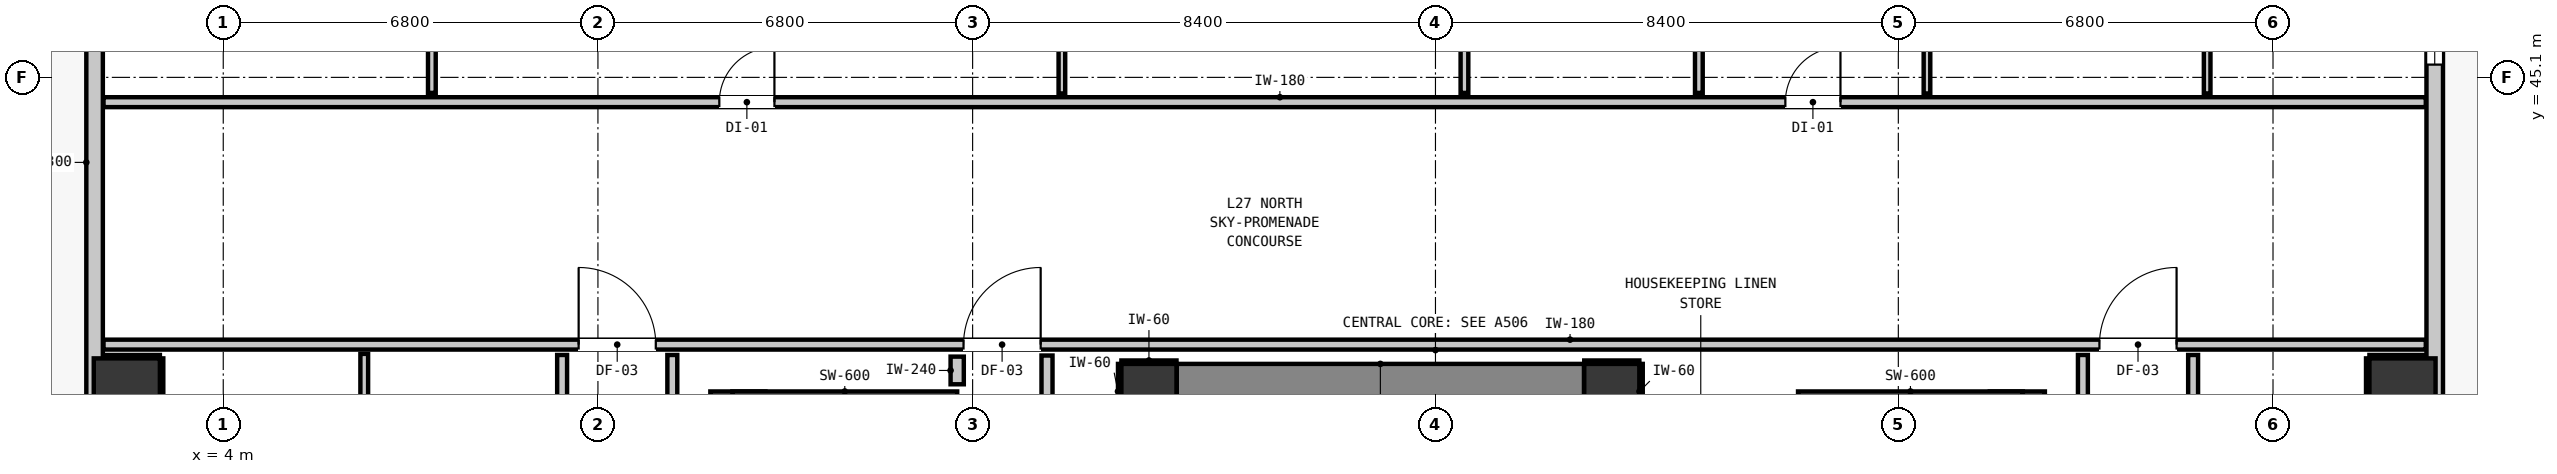
"""IFC4 building model, lengths in metres.
Left out: names, types, materials, properties, quantities, classifications, styles, units other than length and angle.
Written with IfcOpenShell. Run it as: python <this file> out.ifc"""

import sys

from ifc_helpers import new_model, si_unit, direction, frame, frame_2d, origin, origin_2d, place, context, subcontext, project, spatial, rectangle, extrude, element, fill, save


model = new_model("IFC4")
c1 = context("Model", 3, precision=1e-05, world=origin(), true_north=direction((0.0, 1.0)))
c2 = subcontext(c1, "Body", "Model", "MODEL_VIEW")
j1 = project(units=[si_unit("LENGTHUNIT", "METRE"), si_unit("PLANEANGLEUNIT", "RADIAN")], contexts=[c1])
p1 = place(None, origin())
s1 = spatial("IfcSite", under=j1, at=p1, CompositionType="ELEMENT")
p2 = place(p1, origin())
s2 = spatial("IfcBuilding", under=s1, at=p2, CompositionType="ELEMENT")
p3 = place(p2, frame((0.0, 0.0, 96.12)))
s3 = spatial("IfcBuildingStorey", under=s2, at=p3, CompositionType="ELEMENT", Elevation=96.12)
for number, where, z_axis, x_axis in (
    (1, (20.8, 39.4, 0.0), (0.0, 0.0, 1.0), (1.0, 0.0, 0.0)),
    (2, (29.2, 39.4, 0.0), (0.0, 0.0, 1.0), (1.0, 0.0, 0.0)),
):
    element("IfcColumn", number, at=place(p3, frame(where, z_axis=z_axis, x_axis=x_axis)), inside=s3, PredefinedType="COLUMN", context=c2, shape_type="SweptSolid", body=[
        extrude(rectangle(XDim=1.0, YDim=1.0, at=origin_2d()), origin(), (0.0, 0.0, 1.0), 3.32),
    ])
p4 = place(p3, frame((13.34, 31.205, 0.0), z_axis=(0.0, 0.0, 1.0), x_axis=(0.0, 1.0, 0.0)))
e3 = element("IfcWall", 3, at=p4, inside=s3, PredefinedType="SHEAR", context=c2, shape_type="SweptSolid", body=[
    extrude(rectangle(XDim=8.195, YDim=1.0, at=frame_2d((4.097, 0.0))), origin(), (0.0, 0.0, 1.0), 3.32),
])
p5 = place(p3, frame((13.24, 39.1, 0.0), z_axis=(0.0, 0.0, 1.0), x_axis=(1.0, 0.0, 0.0)))
e4 = element("IfcWall", 4, at=p5, inside=s3, PredefinedType="SHEAR", context=c2, shape_type="SweptSolid", body=[
    extrude(rectangle(XDim=4.08, YDim=0.6, at=frame_2d((2.04, 0.0))), origin(), (0.0, 0.0, 1.0), 3.32),
])
p6 = place(p3, frame((36.56, 31.205, 0.0), z_axis=(0.0, 0.0, 1.0), x_axis=(0.0, 1.0, 0.0)))
e5 = element("IfcWall", 5, at=p6, inside=s3, PredefinedType="SHEAR", context=c2, shape_type="SweptSolid", body=[
    extrude(rectangle(XDim=8.195, YDim=1.0, at=frame_2d((4.097, 0.0))), origin(), (0.0, 0.0, 1.0), 3.32),
])
p7 = place(p3, frame((32.58, 39.1, 0.0), z_axis=(0.0, 0.0, 1.0), x_axis=(1.0, 0.0, 0.0)))
e6 = element("IfcWall", 6, at=p7, inside=s3, PredefinedType="SHEAR", context=c2, shape_type="SweptSolid", body=[
    extrude(rectangle(XDim=4.08, YDim=0.6, at=frame_2d((2.04, 0.0))), origin(), (0.0, 0.0, 1.0), 3.32),
])
p8 = place(p3, frame((21.305, 39.4, 0.0), z_axis=(0.0, 0.0, 1.0), x_axis=(1.0, 0.0, 0.0)))
e7 = element("IfcWall", 7, at=p8, inside=s3, PredefinedType="SHEAR", context=c2, shape_type="SweptSolid", body=[
    extrude(rectangle(XDim=7.39, YDim=1.0, at=frame_2d((3.695, 0.0))), origin(), (0.0, 0.0, 1.0), 3.32),
])
for number, where, z_axis, x_axis in (
    (8, (2.25, 39.4, 0.0), (0.0, 0.0, 1.0), (1.0, 0.0, 0.0)),
    (9, (43.55, 39.4, 0.0), (0.0, 0.0, 1.0), (1.0, 0.0, 0.0)),
):
    element("IfcColumn", number, at=place(p3, frame(where, z_axis=z_axis, x_axis=x_axis)), inside=s3, PredefinedType="COLUMN", context=c2, shape_type="SweptSolid", body=[
        extrude(rectangle(XDim=1.2, YDim=1.2, at=origin_2d()), origin(), (0.0, 0.0, 1.0), 3.32),
    ])
p9 = place(p3, frame((1.665, 16.365, 0.0), z_axis=(0.0, 0.0, 1.0), x_axis=(0.0, 1.0, 0.0)))
e10 = element("IfcWall", 10, at=p9, inside=s3, PredefinedType="STANDARD", context=c2, shape_type="SweptSolid", body=[
    extrude(rectangle(XDim=34.67, YDim=0.3, at=frame_2d((17.335, 0.0))), origin(), (0.0, 0.0, 1.0), 3.06),
])
p10 = place(p9, frame((6.854, 0.0, 0.0)))
e11 = element("IfcOpeningElement", 11, at=p10, cuts=e10, PredefinedType="OPENING", context=c2, shape_type="SweptSolid", body=[
    extrude(rectangle(XDim=1.0, YDim=2.15, at=frame_2d((0.5, 1.075))), frame((0.0, 0.16, 0.0), z_axis=(0.0, -1.0, 0.0), x_axis=(1.0, 0.0, 0.0)), (0.0, 0.0, 1.0), 0.32),
])
p11 = place(p9, frame((32.839, 0.0, 0.85)))
e12 = element("IfcOpeningElement", 12, at=p11, cuts=e10, PredefinedType="OPENING", context=c2, shape_type="SweptSolid", body=[
    extrude(rectangle(XDim=1.05, YDim=1.65, at=frame_2d((0.525, 0.825))), frame((0.0, 0.16, 0.0), z_axis=(0.0, -1.0, 0.0), x_axis=(1.0, 0.0, 0.0)), (0.0, 0.0, 1.0), 0.32),
])
p12 = place(p9, frame((10.044, 0.0, 0.85)))
e13 = element("IfcOpeningElement", 13, at=p12, cuts=e10, PredefinedType="OPENING", context=c2, shape_type="SweptSolid", body=[
    extrude(rectangle(XDim=2.4, YDim=1.95, at=frame_2d((1.2, 0.975))), frame((0.0, 0.16, 0.0), z_axis=(0.0, -1.0, 0.0), x_axis=(1.0, 0.0, 0.0)), (0.0, 0.0, 1.0), 0.32),
])
p13 = place(p9, frame((19.145, 0.0, 0.85)))
e14 = element("IfcOpeningElement", 14, at=p13, cuts=e10, PredefinedType="OPENING", context=c2, shape_type="SweptSolid", body=[
    extrude(rectangle(XDim=2.4, YDim=1.95, at=frame_2d((1.2, 0.975))), frame((0.0, 0.16, 0.0), z_axis=(0.0, -1.0, 0.0), x_axis=(1.0, 0.0, 0.0)), (0.0, 0.0, 1.0), 0.32),
])
p14 = place(p3, frame((44.135, 51.035, 0.0), z_axis=(0.0, 0.0, 1.0), x_axis=(0.0, -1.0, 0.0)))
e15 = element("IfcWall", 15, at=p14, inside=s3, PredefinedType="STANDARD", context=c2, shape_type="SweptSolid", body=[
    extrude(rectangle(XDim=34.67, YDim=0.3, at=frame_2d((17.335, 0.0))), origin(), (0.0, 0.0, 1.0), 3.06),
])
p15 = place(p14, frame((0.901, 0.0, 0.0)))
e16 = element("IfcOpeningElement", 16, at=p15, cuts=e15, PredefinedType="OPENING", context=c2, shape_type="SweptSolid", body=[
    extrude(rectangle(XDim=1.0, YDim=2.15, at=frame_2d((0.5, 1.075))), frame((0.0, 0.16, 0.0), z_axis=(0.0, -1.0, 0.0), x_axis=(1.0, 0.0, 0.0)), (0.0, 0.0, 1.0), 0.32),
])
p16 = place(p14, frame((3.303, 0.0, 0.85)))
e17 = element("IfcOpeningElement", 17, at=p16, cuts=e15, PredefinedType="OPENING", context=c2, shape_type="SweptSolid", body=[
    extrude(rectangle(XDim=2.4, YDim=1.95, at=frame_2d((1.2, 0.975))), frame((0.0, 0.16, 0.0), z_axis=(0.0, -1.0, 0.0), x_axis=(1.0, 0.0, 0.0)), (0.0, 0.0, 1.0), 0.32),
])
p17 = place(p14, frame((21.61, 0.0, 0.85)))
e18 = element("IfcOpeningElement", 18, at=p17, cuts=e15, PredefinedType="OPENING", context=c2, shape_type="SweptSolid", body=[
    extrude(rectangle(XDim=2.4, YDim=1.95, at=frame_2d((1.2, 0.975))), frame((0.0, 0.16, 0.0), z_axis=(0.0, -1.0, 0.0), x_axis=(1.0, 0.0, 0.0)), (0.0, 0.0, 1.0), 0.32),
])
p18 = place(p3, frame((1.827, 40.25, 0.0), z_axis=(0.0, 0.0, 1.0), x_axis=(1.0, 0.0, 0.0)))
e19 = element("IfcWall", 19, at=p18, inside=s3, PredefinedType="PARTITIONING", context=c2, shape_type="SweptSolid", body=[
    extrude(rectangle(XDim=42.146, YDim=0.18, at=frame_2d((21.073, 0.0))), origin(), (0.0, 0.0, 1.0), 3.06),
])
p19 = place(p18, frame((15.608, 0.0, 0.0)))
e20 = element("IfcOpeningElement", 20, at=p19, cuts=e19, PredefinedType="OPENING", context=c2, shape_type="SweptSolid", body=[
    extrude(rectangle(XDim=1.4, YDim=2.15, at=frame_2d((0.7, 1.075))), frame((0.0, 0.1, 0.0), z_axis=(0.0, -1.0, 0.0), x_axis=(1.0, 0.0, 0.0)), (0.0, 0.0, 1.0), 0.2),
])
p20 = place(p18, frame((8.623, 0.0, 0.0)))
e21 = element("IfcOpeningElement", 21, at=p20, cuts=e19, PredefinedType="OPENING", context=c2, shape_type="SweptSolid", body=[
    extrude(rectangle(XDim=1.4, YDim=2.15, at=frame_2d((0.7, 1.075))), frame((0.0, 0.1, 0.0), z_axis=(0.0, -1.0, 0.0), x_axis=(1.0, 0.0, 0.0)), (0.0, 0.0, 1.0), 0.2),
])
p21 = place(p18, frame((36.223, 0.0, 0.0)))
e22 = element("IfcOpeningElement", 22, at=p21, cuts=e19, PredefinedType="OPENING", context=c2, shape_type="SweptSolid", body=[
    extrude(rectangle(XDim=1.4, YDim=2.15, at=frame_2d((0.7, 1.075))), frame((0.0, 0.1, 0.0), z_axis=(0.0, -1.0, 0.0), x_axis=(1.0, 0.0, 0.0)), (0.0, 0.0, 1.0), 0.2),
])
p22 = place(p3, frame((1.827, 44.65, 0.0), z_axis=(0.0, 0.0, 1.0), x_axis=(1.0, 0.0, 0.0)))
e23 = element("IfcWall", 23, at=p22, inside=s3, PredefinedType="PARTITIONING", context=c2, shape_type="SweptSolid", body=[
    extrude(rectangle(XDim=42.146, YDim=0.18, at=frame_2d((21.073, 0.0))), origin(), (0.0, 0.0, 1.0), 3.06),
])
p23 = place(p22, frame((11.176, 0.0, 0.0)))
e24 = element("IfcOpeningElement", 24, at=p23, cuts=e23, PredefinedType="OPENING", context=c2, shape_type="SweptSolid", body=[
    extrude(rectangle(XDim=1.0, YDim=2.15, at=frame_2d((0.5, 1.075))), frame((0.0, 0.1, 0.0), z_axis=(0.0, -1.0, 0.0), x_axis=(1.0, 0.0, 0.0)), (0.0, 0.0, 1.0), 0.2),
])
p24 = place(p22, frame((30.523, 0.0, 0.0)))
e25 = element("IfcOpeningElement", 25, at=p24, cuts=e23, PredefinedType="OPENING", context=c2, shape_type="SweptSolid", body=[
    extrude(rectangle(XDim=1.0, YDim=2.15, at=frame_2d((0.5, 1.075))), frame((0.0, 0.1, 0.0), z_axis=(0.0, -1.0, 0.0), x_axis=(1.0, 0.0, 0.0)), (0.0, 0.0, 1.0), 0.2),
])
p25 = place(p3, frame((17.32, 39.53, 0.0), z_axis=(0.0, 0.0, 1.0), x_axis=(0.0, 1.0, 0.0)))
e26 = element("IfcWall", 26, at=p25, inside=s3, PredefinedType="PARTITIONING", context=c2, shape_type="SweptSolid", body=[
    extrude(rectangle(XDim=0.502, YDim=0.24, at=frame_2d((0.251, 0.0))), origin(), (0.0, 0.0, 1.0), 3.06),
])
p26 = place(p3, frame((18.95, 38.918, 0.0), z_axis=(0.0, 0.0, 1.0), x_axis=(0.0, 1.0, 0.0)))
e27 = element("IfcWall", 27, at=p26, inside=s3, PredefinedType="PARTITIONING", context=c2, shape_type="SweptSolid", body=[
    extrude(rectangle(XDim=1.134, YDim=0.2, at=frame_2d((0.567, 0.0))), origin(), (0.0, 0.0, 1.0), 3.06),
])
p27 = place(p3, frame((10.15, 34.688, 0.0), z_axis=(0.0, 0.0, 1.0), x_axis=(0.0, 1.0, 0.0)))
e28 = element("IfcWall", 28, at=p27, inside=s3, PredefinedType="PARTITIONING", context=c2, shape_type="SweptSolid", body=[
    extrude(rectangle(XDim=5.374, YDim=0.18, at=frame_2d((2.687, 0.0))), origin(), (0.0, 0.0, 1.0), 3.06),
])
for number, where, z_axis, x_axis in (
    (29, (12.15, 21.368, 0.0), (0.0, 0.0, 1.0), (0.0, 1.0, 0.0)),
    (30, (37.75, 21.368, 0.0), (0.0, 0.0, 1.0), (0.0, 1.0, 0.0)),
):
    element("IfcWall", number, at=place(p3, frame(where, z_axis=z_axis, x_axis=x_axis)), inside=s3, PredefinedType="PARTITIONING", context=c2, shape_type="SweptSolid", body=[
        extrude(rectangle(XDim=18.694, YDim=0.18, at=frame_2d((9.347, 0.0))), origin(), (0.0, 0.0, 1.0), 3.06),
    ])
p28 = place(p3, frame((39.75, 35.05, 0.0), z_axis=(0.0, 0.0, 1.0), x_axis=(0.0, 1.0, 0.0)))
e31 = element("IfcWall", 31, at=p28, inside=s3, PredefinedType="PARTITIONING", context=c2, shape_type="SweptSolid", body=[
    extrude(rectangle(XDim=5.012, YDim=0.18, at=frame_2d((2.506, 0.0))), origin(), (0.0, 0.0, 1.0), 3.06),
])
p29 = place(p3, frame((6.559, 34.668, 0.0), z_axis=(0.0, 0.0, 1.0), x_axis=(0.0, 1.0, 0.0)))
e32 = element("IfcWall", 32, at=p29, inside=s3, PredefinedType="PARTITIONING", context=c2, shape_type="SweptSolid", body=[
    extrude(rectangle(XDim=5.414, YDim=0.14, at=frame_2d((2.707, 0.0))), origin(), (0.0, 0.0, 1.0), 3.06),
])
p30 = place(p3, frame((7.786, 44.818, 0.0), z_axis=(0.0, 0.0, 1.0), x_axis=(0.0, 1.0, 0.0)))
e33 = element("IfcWall", 33, at=p30, inside=s3, PredefinedType="PARTITIONING", context=c2, shape_type="SweptSolid", body=[
    extrude(rectangle(XDim=3.447, YDim=0.14, at=frame_2d((1.723, 0.0))), origin(), (0.0, 0.0, 1.0), 3.06),
])
p31 = place(p30, frame((1.284, 0.0, 0.0)))
e34 = element("IfcOpeningElement", 34, at=p31, cuts=e33, PredefinedType="OPENING", context=c2, shape_type="SweptSolid", body=[
    extrude(rectangle(XDim=0.86, YDim=2.02, at=frame_2d((0.43, 1.01))), frame((0.0, 0.08, 0.0), z_axis=(0.0, -1.0, 0.0), x_axis=(1.0, 0.0, 0.0)), (0.0, 0.0, 1.0), 0.16),
])
p32 = place(p3, frame((26.526, 44.818, 0.0), z_axis=(0.0, 0.0, 1.0), x_axis=(0.0, 1.0, 0.0)))
e35 = element("IfcWall", 35, at=p32, inside=s3, PredefinedType="PARTITIONING", context=c2, shape_type="SweptSolid", body=[
    extrude(rectangle(XDim=3.447, YDim=0.14, at=frame_2d((1.723, 0.0))), origin(), (0.0, 0.0, 1.0), 3.06),
])
p33 = place(p3, frame((30.78, 44.818, 0.0), z_axis=(0.0, 0.0, 1.0), x_axis=(0.0, 1.0, 0.0)))
e36 = element("IfcWall", 36, at=p33, inside=s3, PredefinedType="PARTITIONING", context=c2, shape_type="SweptSolid", body=[
    extrude(rectangle(XDim=3.447, YDim=0.14, at=frame_2d((1.723, 0.0))), origin(), (0.0, 0.0, 1.0), 3.06),
])
p34 = place(p33, frame((1.296, 0.0, 0.0)))
e37 = element("IfcOpeningElement", 37, at=p34, cuts=e36, PredefinedType="OPENING", context=c2, shape_type="SweptSolid", body=[
    extrude(rectangle(XDim=0.86, YDim=2.02, at=frame_2d((0.43, 1.01))), frame((0.0, 0.08, 0.0), z_axis=(0.0, -1.0, 0.0), x_axis=(1.0, 0.0, 0.0)), (0.0, 0.0, 1.0), 0.16),
])
p35 = place(p3, frame((19.22, 44.808, 0.0), z_axis=(0.0, 0.0, 1.0), x_axis=(0.0, 1.0, 0.0)))
e38 = element("IfcWall", 38, at=p35, inside=s3, PredefinedType="PARTITIONING", context=c2, shape_type="SweptSolid", body=[
    extrude(rectangle(XDim=3.467, YDim=0.12, at=frame_2d((1.733, 0.0))), origin(), (0.0, 0.0, 1.0), 3.06),
])
p36 = place(p35, frame((1.274, 0.0, 0.0)))
e39 = element("IfcOpeningElement", 39, at=p36, cuts=e38, PredefinedType="OPENING", context=c2, shape_type="SweptSolid", body=[
    extrude(rectangle(XDim=0.9, YDim=2.1, at=frame_2d((0.45, 1.05))), frame((0.0, 0.07, 0.0), z_axis=(0.0, -1.0, 0.0), x_axis=(1.0, 0.0, 0.0)), (0.0, 0.0, 1.0), 0.14),
])
p37 = place(p3, frame((34.92, 44.808, 0.0), z_axis=(0.0, 0.0, 1.0), x_axis=(0.0, 1.0, 0.0)))
e40 = element("IfcWall", 40, at=p37, inside=s3, PredefinedType="PARTITIONING", context=c2, shape_type="SweptSolid", body=[
    extrude(rectangle(XDim=3.467, YDim=0.12, at=frame_2d((1.733, 0.0))), origin(), (0.0, 0.0, 1.0), 3.06),
])
p38 = place(p37, frame((1.286, 0.0, 0.0)))
e41 = element("IfcOpeningElement", 41, at=p38, cuts=e40, PredefinedType="OPENING", context=c2, shape_type="SweptSolid", body=[
    extrude(rectangle(XDim=0.9, YDim=2.1, at=frame_2d((0.45, 1.05))), frame((0.0, 0.07, 0.0), z_axis=(0.0, -1.0, 0.0), x_axis=(1.0, 0.0, 0.0)), (0.0, 0.0, 1.0), 0.14),
])
p39 = place(p3, frame((40.005, 44.808, 0.0), z_axis=(0.0, 0.0, 1.0), x_axis=(0.0, 1.0, 0.0)))
e42 = element("IfcWall", 42, at=p39, inside=s3, PredefinedType="PARTITIONING", context=c2, shape_type="SweptSolid", body=[
    extrude(rectangle(XDim=3.467, YDim=0.12, at=frame_2d((1.733, 0.0))), origin(), (0.0, 0.0, 1.0), 2.445),
])
p40 = place(p39, frame((1.273, 0.0, 0.0)))
e43 = element("IfcOpeningElement", 43, at=p40, cuts=e42, PredefinedType="OPENING", context=c2, shape_type="SweptSolid", body=[
    extrude(rectangle(XDim=0.9, YDim=2.1, at=frame_2d((0.45, 1.05))), frame((0.0, 0.07, 0.0), z_axis=(0.0, -1.0, 0.0), x_axis=(1.0, 0.0, 0.0)), (0.0, 0.0, 1.0), 0.14),
])
for number, where, z_axis, x_axis in (
    (44, (20.3, 39.932, 0.0), (0.0, 0.0, 1.0), (1.0, 0.0, 0.0)),
    (45, (20.268, 38.9, 0.0), (0.0, 0.0, 1.0), (0.0, 1.0, 0.0)),
    (46, (28.7, 39.932, 0.0), (0.0, 0.0, 1.0), (1.0, 0.0, 0.0)),
    (47, (29.732, 38.9, 0.0), (0.0, 0.0, 1.0), (0.0, 1.0, 0.0)),
):
    element("IfcWall", number, at=place(p3, frame(where, z_axis=z_axis, x_axis=x_axis)), inside=s3, PredefinedType="PARTITIONING", context=c2, shape_type="SweptSolid", body=[
        extrude(rectangle(XDim=1.0, YDim=0.06, at=frame_2d((0.5, 0.0))), origin(), (0.0, 0.0, 1.0), 1.45),
    ])
p41 = place(p3, frame((1.83, 40.032, 0.0), z_axis=(0.0, 0.0, 1.0), x_axis=(1.0, 0.0, 0.0)))
e48 = element("IfcWall", 48, at=p41, inside=s3, PredefinedType="PARTITIONING", context=c2, shape_type="SweptSolid", body=[
    extrude(rectangle(XDim=1.02, YDim=0.06, at=frame_2d((0.51, 0.0))), origin(), (0.0, 0.0, 1.0), 1.45),
])
p42 = place(p3, frame((2.882, 38.8, 0.0), z_axis=(0.0, 0.0, 1.0), x_axis=(0.0, 1.0, 0.0)))
e49 = element("IfcWall", 49, at=p42, inside=s3, PredefinedType="PARTITIONING", context=c2, shape_type="SweptSolid", body=[
    extrude(rectangle(XDim=1.2, YDim=0.06, at=frame_2d((0.6, 0.0))), origin(), (0.0, 0.0, 1.0), 1.45),
])
p43 = place(p3, frame((42.95, 40.032, 0.0), z_axis=(0.0, 0.0, 1.0), x_axis=(1.0, 0.0, 0.0)))
e50 = element("IfcWall", 50, at=p43, inside=s3, PredefinedType="PARTITIONING", context=c2, shape_type="SweptSolid", body=[
    extrude(rectangle(XDim=1.02, YDim=0.06, at=frame_2d((0.51, 0.0))), origin(), (0.0, 0.0, 1.0), 1.45),
])
p44 = place(p3, frame((42.918, 38.8, 0.0), z_axis=(0.0, 0.0, 1.0), x_axis=(0.0, 1.0, 0.0)))
e51 = element("IfcWall", 51, at=p44, inside=s3, PredefinedType="PARTITIONING", context=c2, shape_type="SweptSolid", body=[
    extrude(rectangle(XDim=1.2, YDim=0.06, at=frame_2d((0.6, 0.0))), origin(), (0.0, 0.0, 1.0), 1.45),
])
p45 = place(p16, origin())
e52 = element("IfcWindow", 52, at=p45, inside=s3, PartitioningType="SINGLE_PANEL", PredefinedType="WINDOW", context=c2, shape_type="SweptSolid", body=[
    extrude(rectangle(XDim=2.4, YDim=1.95, at=frame_2d((1.2, 0.975))), frame((0.0, 0.03, 0.0), z_axis=(0.0, -1.0, 0.0), x_axis=(1.0, 0.0, 0.0)), (0.0, 0.0, 1.0), 0.06),
])
fill(e17, e52)
p46 = place(p19, origin())
e53 = element("IfcDoor", 53, at=p46, inside=s3, OperationType="SINGLE_SWING_RIGHT", PredefinedType="DOOR", context=c2, shape_type="SweptSolid", body=[
    extrude(rectangle(XDim=1.4, YDim=2.15, at=frame_2d((0.7, 1.075))), frame((0.0, 0.025, 0.0), z_axis=(0.0, -1.0, 0.0), x_axis=(1.0, 0.0, 0.0)), (0.0, 0.0, 1.0), 0.05),
])
fill(e20, e53)
p47 = place(p20, origin())
e54 = element("IfcDoor", 54, at=p47, inside=s3, OperationType="SINGLE_SWING_LEFT", PredefinedType="DOOR", context=c2, shape_type="SweptSolid", body=[
    extrude(rectangle(XDim=1.4, YDim=2.15, at=frame_2d((0.7, 1.075))), frame((0.0, 0.025, 0.0), z_axis=(0.0, -1.0, 0.0), x_axis=(1.0, 0.0, 0.0)), (0.0, 0.0, 1.0), 0.05),
])
fill(e21, e54)
p48 = place(p21, origin())
e55 = element("IfcDoor", 55, at=p48, inside=s3, OperationType="SINGLE_SWING_RIGHT", PredefinedType="DOOR", context=c2, shape_type="SweptSolid", body=[
    extrude(rectangle(XDim=1.4, YDim=2.15, at=frame_2d((0.7, 1.075))), frame((0.0, 0.025, 0.0), z_axis=(0.0, -1.0, 0.0), x_axis=(1.0, 0.0, 0.0)), (0.0, 0.0, 1.0), 0.05),
])
fill(e22, e55)
p49 = place(p23, origin())
e56 = element("IfcDoor", 56, at=p49, inside=s3, OperationType="SINGLE_SWING_RIGHT", PredefinedType="DOOR", context=c2, shape_type="SweptSolid", body=[
    extrude(rectangle(XDim=1.0, YDim=2.15, at=frame_2d((0.5, 1.075))), frame((0.0, 0.025, 0.0), z_axis=(0.0, -1.0, 0.0), x_axis=(1.0, 0.0, 0.0)), (0.0, 0.0, 1.0), 0.05),
])
fill(e24, e56)
p50 = place(p24, origin())
e57 = element("IfcDoor", 57, at=p50, inside=s3, OperationType="SINGLE_SWING_RIGHT", PredefinedType="DOOR", context=c2, shape_type="SweptSolid", body=[
    extrude(rectangle(XDim=1.0, YDim=2.15, at=frame_2d((0.5, 1.075))), frame((0.0, 0.025, 0.0), z_axis=(0.0, -1.0, 0.0), x_axis=(1.0, 0.0, 0.0)), (0.0, 0.0, 1.0), 0.05),
])
fill(e25, e57)
save(model, sys.argv[1])
